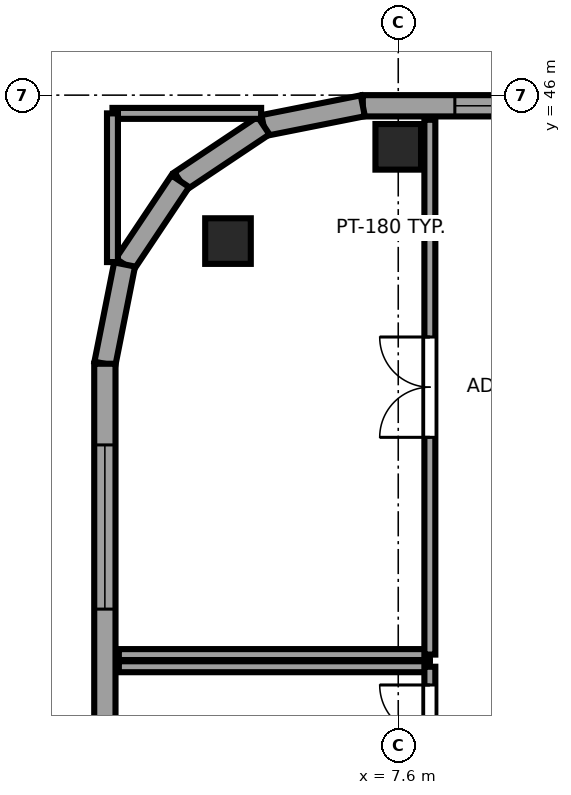
"""IFC4 building model, lengths in metres.
Left out: names, types, materials, properties, quantities, classifications, styles, units other than length and angle.
Written with IfcOpenShell. Run it as: python <this file> out.ifc"""

import sys

from ifc_helpers import new_model, si_unit, direction, frame, frame_2d, origin, origin_2d, place, context, subcontext, project, spatial, rectangle, extrude, source, transform, mapped, element, fill, save


model = new_model("IFC4")
c1 = context("Model", 3, precision=1e-05, world=origin(), true_north=direction((0.0, 1.0)))
c2 = subcontext(c1, "Body", "Model", "MODEL_VIEW")
j1 = project(units=[si_unit("LENGTHUNIT", "METRE"), si_unit("PLANEANGLEUNIT", "RADIAN")], contexts=[c1])
p1 = place(None, origin())
s1 = spatial("IfcSite", under=j1, at=p1, CompositionType="ELEMENT")
p2 = place(p1, origin())
s2 = spatial("IfcBuilding", under=s1, at=p2, CompositionType="ELEMENT")
p3 = place(p2, frame((0.0, 0.0, 231.0)))
s3 = spatial("IfcBuildingStorey", under=s2, at=p3, CompositionType="ELEMENT", Elevation=231.0)
m1 = source(origin(), c2, "Body", "SweptSolid", [
    extrude(rectangle(XDim=0.75, YDim=0.75, at=origin_2d()), origin(), (0.0, 0.0, 1.0), 3.55),
])
for number, where, z_axis, x_axis in (
    (1, (4.8, 43.6, 0.0), (0.0, 0.0, 1.0), (1.0, 0.0, 0.0)),
    (2, (7.6, 45.15, 0.0), (0.0, 0.0, 1.0), (1.0, 0.0, 0.0)),
):
    element("IfcColumn", number, at=place(p3, frame(where, z_axis=z_axis, x_axis=x_axis)), inside=s3, PredefinedType="COLUMN", context=c2, shape_type="MappedRepresentation", body=[
        mapped(m1, transform((0.0, 0.0, 0.0), x_axis=(1.0, 0.0, 0.0), y_axis=(0.0, 1.0, 0.0), z_axis=(0.0, 0.0, 1.0), scale=1.0)),
    ])
p4 = place(p3, frame((35.383, 45.825, 0.0), z_axis=(0.0, 0.0, 1.0), x_axis=(-1.0, 0.0, 0.0)))
e3 = element("IfcWall", 3, at=p4, inside=s3, PredefinedType="SOLIDWALL", context=c2, shape_type="SweptSolid", body=[
    extrude(rectangle(XDim=28.366, YDim=0.35, at=frame_2d((14.183, 0.0))), origin(), (0.0, 0.0, 1.0), 3.37),
])
p5 = place(p4, frame((1.514, 0.0, 0.68)))
e4 = element("IfcOpeningElement", 4, at=p5, cuts=e3, PredefinedType="OPENING", context=c2, shape_type="SweptSolid", body=[
    extrude(rectangle(XDim=2.7, YDim=1.95, at=frame_2d((1.35, 0.975))), frame((0.0, 0.185, 0.0), z_axis=(0.0, -1.0, 0.0), x_axis=(1.0, 0.0, 0.0)), (0.0, 0.0, 1.0), 0.37),
])
p6 = place(p4, frame((6.041, 0.0, 0.68)))
e5 = element("IfcOpeningElement", 5, at=p6, cuts=e3, PredefinedType="OPENING", context=c2, shape_type="SweptSolid", body=[
    extrude(rectangle(XDim=2.7, YDim=1.95, at=frame_2d((1.35, 0.975))), frame((0.0, 0.185, 0.0), z_axis=(0.0, -1.0, 0.0), x_axis=(1.0, 0.0, 0.0)), (0.0, 0.0, 1.0), 0.37),
])
p7 = place(p4, frame((10.569, 0.0, 0.68)))
e6 = element("IfcOpeningElement", 6, at=p7, cuts=e3, PredefinedType="OPENING", context=c2, shape_type="SweptSolid", body=[
    extrude(rectangle(XDim=2.7, YDim=1.95, at=frame_2d((1.35, 0.975))), frame((0.0, 0.185, 0.0), z_axis=(0.0, -1.0, 0.0), x_axis=(1.0, 0.0, 0.0)), (0.0, 0.0, 1.0), 0.37),
])
p8 = place(p4, frame((15.097, 0.0, 0.68)))
e7 = element("IfcOpeningElement", 7, at=p8, cuts=e3, PredefinedType="OPENING", context=c2, shape_type="SweptSolid", body=[
    extrude(rectangle(XDim=2.7, YDim=1.95, at=frame_2d((1.35, 0.975))), frame((0.0, 0.185, 0.0), z_axis=(0.0, -1.0, 0.0), x_axis=(1.0, 0.0, 0.0)), (0.0, 0.0, 1.0), 0.37),
])
p9 = place(p4, frame((19.624, 0.0, 0.68)))
e8 = element("IfcOpeningElement", 8, at=p9, cuts=e3, PredefinedType="OPENING", context=c2, shape_type="SweptSolid", body=[
    extrude(rectangle(XDim=2.7, YDim=1.95, at=frame_2d((1.35, 0.975))), frame((0.0, 0.185, 0.0), z_axis=(0.0, -1.0, 0.0), x_axis=(1.0, 0.0, 0.0)), (0.0, 0.0, 1.0), 0.37),
])
p10 = place(p4, frame((24.152, 0.0, 0.68)))
e9 = element("IfcOpeningElement", 9, at=p10, cuts=e3, PredefinedType="OPENING", context=c2, shape_type="SweptSolid", body=[
    extrude(rectangle(XDim=2.7, YDim=1.95, at=frame_2d((1.35, 0.975))), frame((0.0, 0.185, 0.0), z_axis=(0.0, -1.0, 0.0), x_axis=(1.0, 0.0, 0.0)), (0.0, 0.0, 1.0), 0.37),
])
p11 = place(p3, frame((7.017, 45.825, 0.0), z_axis=(0.0, 0.0, 1.0), x_axis=(-0.980788844421, -0.195072403631, 0.0)))
e10 = element("IfcWall", 10, at=p11, inside=s3, PredefinedType="SOLIDWALL", context=c2, shape_type="SweptSolid", body=[
    extrude(rectangle(XDim=1.665, YDim=0.35, at=frame_2d((0.832, 0.0))), origin(), (0.0, 0.0, 1.0), 3.37),
])
for number, where, z_axis, x_axis in (
    (11, (5.385, 45.5, 0.0), (0.0, 0.0, 1.0), (-0.832, -0.556, 0.0)),
    (12, (4.015, 44.585, 0.0), (0.0, 0.0, 1.0), (-0.556, -0.831, 0.0)),
):
    element("IfcWall", number, at=place(p3, frame(where, z_axis=z_axis, x_axis=x_axis)), inside=s3, PredefinedType="SOLIDWALL", context=c2, shape_type="SweptSolid", body=[
        extrude(rectangle(XDim=1.647, YDim=0.35, at=frame_2d((0.824, 0.0))), origin(), (0.0, 0.0, 1.0), 2.9),
    ])
p12 = place(p3, frame((3.1, 43.216, 0.0), z_axis=(0.0, 0.0, 1.0), x_axis=(-0.195044345786, -0.980794424524, 0.0)))
e13 = element("IfcWall", 13, at=p12, inside=s3, PredefinedType="SOLIDWALL", context=c2, shape_type="SweptSolid", body=[
    extrude(rectangle(XDim=1.665, YDim=0.35, at=frame_2d((0.833, 0.0))), origin(), (0.0, 0.0, 1.0), 3.37),
])
p13 = place(p3, frame((2.775, 41.583, 0.0), z_axis=(0.0, 0.0, 1.0), x_axis=(0.0, -1.0, 0.0)))
e14 = element("IfcWall", 14, at=p13, inside=s3, PredefinedType="SOLIDWALL", context=c2, shape_type="SweptSolid", body=[
    extrude(rectangle(XDim=34.566, YDim=0.35, at=frame_2d((17.283, 0.0))), origin(), (0.0, 0.0, 1.0), 3.37),
])
p14 = place(p13, frame((1.335, 0.0, 0.68)))
e15 = element("IfcOpeningElement", 15, at=p14, cuts=e14, PredefinedType="OPENING", context=c2, shape_type="SweptSolid", body=[
    extrude(rectangle(XDim=2.7, YDim=1.95, at=frame_2d((1.35, 0.975))), frame((0.0, 0.185, 0.0), z_axis=(0.0, -1.0, 0.0), x_axis=(1.0, 0.0, 0.0)), (0.0, 0.0, 1.0), 0.37),
])
p15 = place(p13, frame((10.227, 0.0, 0.68)))
e16 = element("IfcOpeningElement", 16, at=p15, cuts=e14, PredefinedType="OPENING", context=c2, shape_type="SweptSolid", body=[
    extrude(rectangle(XDim=2.7, YDim=1.95, at=frame_2d((1.35, 0.975))), frame((0.0, 0.185, 0.0), z_axis=(0.0, -1.0, 0.0), x_axis=(1.0, 0.0, 0.0)), (0.0, 0.0, 1.0), 0.37),
])
p16 = place(p13, frame((13.847, 0.0, 0.68)))
e17 = element("IfcOpeningElement", 17, at=p16, cuts=e14, PredefinedType="OPENING", context=c2, shape_type="SweptSolid", body=[
    extrude(rectangle(XDim=2.7, YDim=1.95, at=frame_2d((1.35, 0.975))), frame((0.0, 0.185, 0.0), z_axis=(0.0, -1.0, 0.0), x_axis=(1.0, 0.0, 0.0)), (0.0, 0.0, 1.0), 0.37),
])
p17 = place(p13, frame((18.568, 0.0, 0.68)))
e18 = element("IfcOpeningElement", 18, at=p17, cuts=e14, PredefinedType="OPENING", context=c2, shape_type="SweptSolid", body=[
    extrude(rectangle(XDim=2.7, YDim=1.95, at=frame_2d((1.35, 0.975))), frame((0.0, 0.185, 0.0), z_axis=(0.0, -1.0, 0.0), x_axis=(1.0, 0.0, 0.0)), (0.0, 0.0, 1.0), 0.37),
])
p18 = place(p13, frame((26.36, 0.0, 0.68)))
e19 = element("IfcOpeningElement", 19, at=p18, cuts=e14, PredefinedType="OPENING", context=c2, shape_type="SweptSolid", body=[
    extrude(rectangle(XDim=2.7, YDim=1.95, at=frame_2d((1.35, 0.975))), frame((0.0, 0.185, 0.0), z_axis=(0.0, -1.0, 0.0), x_axis=(1.0, 0.0, 0.0)), (0.0, 0.0, 1.0), 0.37),
])
p19 = place(p3, frame((3.005, 36.6, 0.0), z_axis=(0.0, 0.0, 1.0), x_axis=(1.0, 0.0, 0.0)))
e20 = element("IfcWall", 20, at=p19, inside=s3, PredefinedType="PARTITIONING", context=c2, shape_type="SweptSolid", body=[
    extrude(rectangle(XDim=5.115, YDim=0.18, at=frame_2d((2.558, 0.0))), origin(), (0.0, 0.0, 1.0), 3.37),
])
p20 = place(p3, frame((8.12, 31.65, 0.0), z_axis=(0.0, 0.0, 1.0), x_axis=(0.0, 1.0, 0.0)))
e21 = element("IfcWall", 21, at=p20, inside=s3, PredefinedType="PARTITIONING", context=c2, shape_type="SweptSolid", body=[
    extrude(rectangle(XDim=4.95, YDim=0.18, at=frame_2d((2.475, 0.0))), origin(), (0.0, 0.0, 1.0), 3.37),
])
p21 = place(p20, frame((3.0, 0.0, 0.0)))
e22 = element("IfcOpeningElement", 22, at=p21, cuts=e21, PredefinedType="OPENING", context=c2, shape_type="SweptSolid", body=[
    extrude(rectangle(XDim=1.65, YDim=2.15, at=frame_2d((0.825, 1.075))), frame((0.0, 0.1, 0.0), z_axis=(0.0, -1.0, 0.0), x_axis=(1.0, 0.0, 0.0)), (0.0, 0.0, 1.0), 0.2),
])
p22 = place(p3, frame((3.005, 36.8, 0.0), z_axis=(0.0, 0.0, 1.0), x_axis=(1.0, 0.0, 0.0)))
e23 = element("IfcWall", 23, at=p22, inside=s3, PredefinedType="PARTITIONING", context=c2, shape_type="SweptSolid", body=[
    extrude(rectangle(XDim=5.115, YDim=0.18, at=frame_2d((2.558, 0.0))), origin(), (0.0, 0.0, 1.0), 3.37),
])
for number, where, z_axis, x_axis in (
    (24, (2.9, 45.7, 0.0), (0.0, 0.0, 1.0), (1.0, 0.0, 0.0)),
    (25, (2.9, 43.255, 0.0), (0.0, 0.0, 1.0), (0.0, 1.0, 0.0)),
):
    element("IfcWall", number, at=place(p3, frame(where, z_axis=z_axis, x_axis=x_axis)), inside=s3, PredefinedType="PARTITIONING", context=c2, shape_type="SweptSolid", body=[
        extrude(rectangle(XDim=2.445, YDim=0.18, at=frame_2d((1.223, 0.0))), origin(), (0.0, 0.0, 1.0), 3.37),
    ])
p23 = place(p3, frame((8.12, 36.8, 0.0), z_axis=(0.0, 0.0, 1.0), x_axis=(0.0, 1.0, 0.0)))
e26 = element("IfcWall", 26, at=p23, inside=s3, PredefinedType="PARTITIONING", context=c2, shape_type="SweptSolid", body=[
    extrude(rectangle(XDim=8.795, YDim=0.18, at=frame_2d((4.397, 0.0))), origin(), (0.0, 0.0, 1.0), 3.37),
])
p24 = place(p23, frame((3.573, 0.0, 0.0)))
e27 = element("IfcOpeningElement", 27, at=p24, cuts=e26, PredefinedType="OPENING", context=c2, shape_type="SweptSolid", body=[
    extrude(rectangle(XDim=1.65, YDim=2.15, at=frame_2d((0.825, 1.075))), frame((0.0, 0.1, 0.0), z_axis=(0.0, -1.0, 0.0), x_axis=(1.0, 0.0, 0.0)), (0.0, 0.0, 1.0), 0.2),
])
m2 = source(origin(), c2, "Body", "SweptSolid", [
    extrude(rectangle(XDim=2.7, YDim=1.95, at=frame_2d((1.35, 0.975))), frame((0.0, 0.09, 0.0), z_axis=(0.0, -1.0, 0.0), x_axis=(1.0, 0.0, 0.0)), (0.0, 0.0, 1.0), 0.06),
])
p25 = place(p10, origin())
e28 = element("IfcWindow", 28, at=p25, inside=s3, PartitioningType="TRIPLE_PANEL_HORIZONTAL", PredefinedType="WINDOW", context=c2, shape_type="MappedRepresentation", body=[
    mapped(m2, transform((0.0, 0.0, 0.0), x_axis=(1.0, 0.0, 0.0), y_axis=(0.0, 1.0, 0.0), z_axis=(0.0, 0.0, 1.0), scale=1.0)),
])
fill(e9, e28)
p26 = place(p14, origin())
e29 = element("IfcWindow", 29, at=p26, inside=s3, PartitioningType="TRIPLE_PANEL_HORIZONTAL", PredefinedType="WINDOW", context=c2, shape_type="MappedRepresentation", body=[
    mapped(m2, transform((0.0, 0.0, 0.0), x_axis=(1.0, 0.0, 0.0), y_axis=(0.0, 1.0, 0.0), z_axis=(0.0, 0.0, 1.0), scale=1.0)),
])
fill(e15, e29)
m3 = source(origin(), c2, "Body", "SweptSolid", [
    extrude(rectangle(XDim=1.65, YDim=2.15, at=frame_2d((0.825, 1.075))), frame((0.0, 0.025, 0.0), z_axis=(0.0, -1.0, 0.0), x_axis=(1.0, 0.0, 0.0)), (0.0, 0.0, 1.0), 0.05),
])
p27 = place(p21, origin())
e30 = element("IfcDoor", 30, at=p27, inside=s3, OperationType="DOUBLE_DOOR_SINGLE_SWING", PredefinedType="DOOR", context=c2, shape_type="MappedRepresentation", body=[
    mapped(m3, transform((0.0, 0.0, 0.0), x_axis=(1.0, 0.0, 0.0), y_axis=(0.0, 1.0, 0.0), z_axis=(0.0, 0.0, 1.0), scale=1.0)),
])
fill(e22, e30)
p28 = place(p24, origin())
e31 = element("IfcDoor", 31, at=p28, inside=s3, OperationType="DOUBLE_DOOR_SINGLE_SWING", PredefinedType="DOOR", context=c2, shape_type="MappedRepresentation", body=[
    mapped(m3, transform((0.0, 0.0, 0.0), x_axis=(1.0, 0.0, 0.0), y_axis=(0.0, 1.0, 0.0), z_axis=(0.0, 0.0, 1.0), scale=1.0)),
])
fill(e27, e31)
save(model, sys.argv[1])
